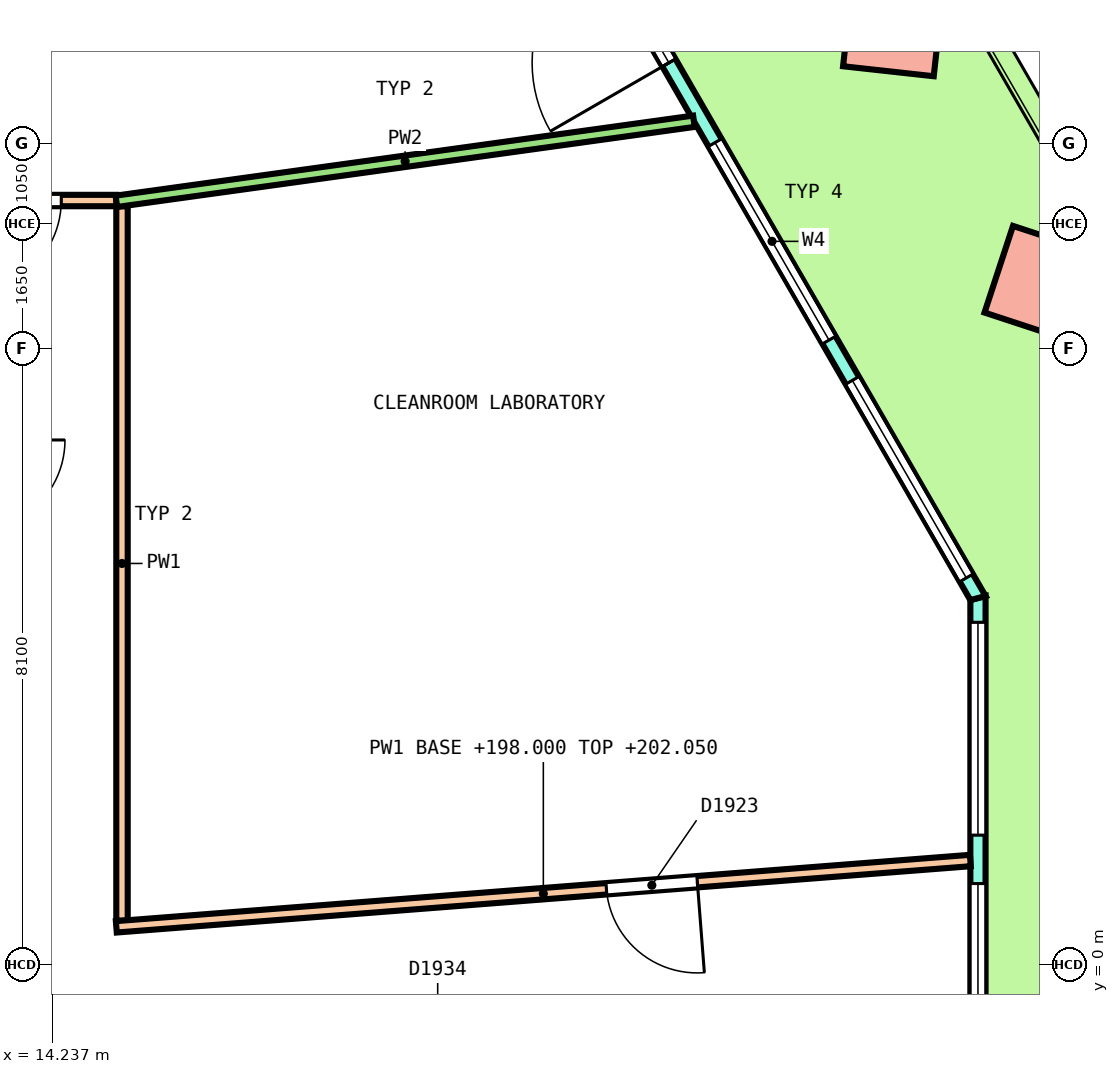
"""IFC4 building model, lengths in metres.
Left out: names, types, materials, properties, quantities, classifications, styles, units other than length and angle.
Written with IfcOpenShell. Run it as: python <this file> out.ifc"""

import sys

from ifc_helpers import new_model, si_unit, direction, frame, frame_2d, origin, origin_2d, place, context, subcontext, project, spatial, polyline, rectangle, outline, extrude, element, fill, save


model = new_model("IFC4")
c1 = context("Model", 3, precision=1e-05, world=origin(), true_north=direction((0.0, 1.0)))
c2 = subcontext(c1, "Body", "Model", "MODEL_VIEW")
j1 = project(units=[si_unit("LENGTHUNIT", "METRE"), si_unit("PLANEANGLEUNIT", "RADIAN")], contexts=[c1])
p1 = place(None, origin())
s1 = spatial("IfcSite", under=j1, at=p1, CompositionType="ELEMENT")
p2 = place(p1, origin())
s2 = spatial("IfcBuilding", under=s1, at=p2, CompositionType="ELEMENT")
p3 = place(p2, frame((0.0, 0.0, 198.0)))
s3 = spatial("IfcBuildingStorey", under=s2, at=p3, CompositionType="ELEMENT", Elevation=198.0)
p4 = place(p3, frame((27.255, 8.959, 0.0), z_axis=(-0.206606302498, -0.238581087409, 0.9488903522), x_axis=(-0.524170547966, 0.845891471379, 0.09855381927)))
e1 = element("IfcColumn", 1, at=p4, inside=s3, PredefinedType="COLUMN", context=c2, shape_type="SweptSolid", body=[
    extrude(rectangle(XDim=1.2, YDim=1.2, at=origin_2d()), origin(), (0.0, 0.0, 1.0), 4.268),
])
p5 = place(p3, frame((25.299, 12.347, 0.0), z_axis=(-0.242193067254, -0.17977691371, 0.953426861102), x_axis=(-0.508628610196, 0.860352489456, 0.033023185463)))
e2 = element("IfcColumn", 2, at=p5, inside=s3, PredefinedType="COLUMN", context=c2, shape_type="SweptSolid", body=[
    extrude(rectangle(XDim=1.2, YDim=1.2, at=origin_2d()), origin(), (0.0, 0.0, 1.0), 4.248),
])
p6 = place(p3, frame((26.411, -2.055, 0.0), z_axis=(0.0, 0.0, 1.0), x_axis=(0.0, 1.0, 0.0)))
e3 = element("IfcWall", 3, at=p6, inside=s3, PredefinedType="SOLIDWALL", context=c2, shape_type="SweptSolid", body=[
    extrude(outline(polyline([(-0.027, -0.1), (1.128, -0.1), (2.283, -0.1), (3.438, -0.1), (4.592, -0.1), (5.747, -0.1), (6.902, -0.1), (6.848, 0.1), (5.711, 0.1), (4.574, 0.1), (3.438, 0.1), (2.301, 0.1), (1.164, 0.1), (0.027, 0.1), (-0.027, -0.1)])), origin(), (0.0, 0.0, 1.0), 4.1),
])
p7 = place(p6, frame((0.319, 0.0, 0.1)))
e4 = element("IfcOpeningElement", 4, at=p7, cuts=e3, PredefinedType="OPENING", context=c2, shape_type="SweptSolid", body=[
    extrude(rectangle(XDim=2.8, YDim=2.9, at=frame_2d((1.4, 1.45))), frame((0.0, 0.11, 0.0), z_axis=(0.0, -1.0, 0.0), x_axis=(1.0, 0.0, 0.0)), (0.0, 0.0, 1.0), 0.22),
])
p8 = place(p6, frame((3.756, 0.0, 0.1)))
e5 = element("IfcOpeningElement", 5, at=p8, cuts=e3, PredefinedType="OPENING", context=c2, shape_type="SweptSolid", body=[
    extrude(rectangle(XDim=2.8, YDim=2.9, at=frame_2d((1.4, 1.45))), frame((0.0, 0.11, 0.0), z_axis=(0.0, -1.0, 0.0), x_axis=(1.0, 0.0, 0.0)), (0.0, 0.0, 1.0), 0.22),
])
p9 = place(p3, frame((26.411, 4.82, 0.0), z_axis=(0.0, 0.0, 1.0), x_axis=(-0.500000137386, 0.866025324465, 0.0)))
e6 = element("IfcWall", 6, at=p9, inside=s3, PredefinedType="SOLIDWALL", context=c2, shape_type="SweptSolid", body=[
    extrude(outline(polyline([(-0.027, -0.1), (0.979, -0.1), (1.986, -0.1), (2.992, -0.1), (3.999, -0.1), (5.005, -0.1), (6.012, -0.1), (7.018, -0.1), (8.025, -0.1), (9.031, -0.1), (10.038, -0.1), (11.044, -0.1), (12.051, -0.1), (13.057, -0.1), (14.063, -0.1), (15.07, -0.1), (16.076, -0.1), (17.083, -0.1), (18.089, -0.1), (18.036, 0.1), (17.035, 0.1), (16.035, 0.1), (15.034, 0.1), (14.034, 0.1), (13.033, 0.1), (12.033, 0.1), (11.032, 0.1), (10.032, 0.1), (9.031, 0.1), (8.031, 0.1), (7.03, 0.1), (6.03, 0.1), (5.029, 0.1), (4.029, 0.1), (3.028, 0.1), (2.028, 0.1), (1.027, 0.1), (0.027, 0.1), (-0.027, -0.1)])), origin(), (0.0, 0.0, 1.0), 4.1),
])
p10 = place(p9, frame((0.306, 0.0, 0.1)))
e7 = element("IfcOpeningElement", 7, at=p10, cuts=e6, PredefinedType="OPENING", context=c2, shape_type="SweptSolid", body=[
    extrude(rectangle(XDim=3.0, YDim=2.9, at=frame_2d((1.5, 1.45))), frame((0.0, 0.11, 0.0), z_axis=(0.0, -1.0, 0.0), x_axis=(1.0, 0.0, 0.0)), (0.0, 0.0, 1.0), 0.22),
])
p11 = place(p9, frame((3.919, 0.0, 0.1)))
e8 = element("IfcOpeningElement", 8, at=p11, cuts=e6, PredefinedType="OPENING", context=c2, shape_type="SweptSolid", body=[
    extrude(rectangle(XDim=3.0, YDim=2.9, at=frame_2d((1.5, 1.45))), frame((0.0, 0.11, 0.0), z_axis=(0.0, -1.0, 0.0), x_axis=(1.0, 0.0, 0.0)), (0.0, 0.0, 1.0), 0.22),
])
p12 = place(p9, frame((8.131, 0.0, 0.0)))
e9 = element("IfcOpeningElement", 9, at=p12, cuts=e6, PredefinedType="OPENING", context=c2, shape_type="SweptSolid", body=[
    extrude(rectangle(XDim=1.8, YDim=2.4, at=frame_2d((0.9, 1.2))), frame((0.0, 0.11, 0.0), z_axis=(0.0, -1.0, 0.0), x_axis=(1.0, 0.0, 0.0)), (0.0, 0.0, 1.0), 0.22),
])
p13 = place(p9, frame((8.131, 0.0, 2.55)))
e10 = element("IfcOpeningElement", 10, at=p13, cuts=e6, PredefinedType="OPENING", context=c2, shape_type="SweptSolid", body=[
    extrude(rectangle(XDim=1.8, YDim=0.45, at=frame_2d((0.9, 0.225))), frame((0.0, 0.11, 0.0), z_axis=(0.0, -1.0, 0.0), x_axis=(1.0, 0.0, 0.0)), (0.0, 0.0, 1.0), 0.22),
])
p14 = place(p9, frame((11.144, 0.0, 0.1)))
e11 = element("IfcOpeningElement", 11, at=p14, cuts=e6, PredefinedType="OPENING", context=c2, shape_type="SweptSolid", body=[
    extrude(rectangle(XDim=3.0, YDim=2.9, at=frame_2d((1.5, 1.45))), frame((0.0, 0.11, 0.0), z_axis=(0.0, -1.0, 0.0), x_axis=(1.0, 0.0, 0.0)), (0.0, 0.0, 1.0), 0.22),
])
p15 = place(p9, frame((14.756, 0.0, 0.1)))
e12 = element("IfcOpeningElement", 12, at=p15, cuts=e6, PredefinedType="OPENING", context=c2, shape_type="SweptSolid", body=[
    extrude(rectangle(XDim=3.0, YDim=2.9, at=frame_2d((1.5, 1.45))), frame((0.0, 0.11, 0.0), z_axis=(0.0, -1.0, 0.0), x_axis=(1.0, 0.0, 0.0)), (0.0, 0.0, 1.0), 0.22),
])
p16 = place(p3, frame((15.15, 0.576, 0.0), z_axis=(0.0, 0.0, 1.0), x_axis=(0.0, 1.0, 0.0)))
e13 = element("IfcWall", 13, at=p16, inside=s3, PredefinedType="PARTITIONING", context=c2, shape_type="SweptSolid", body=[
    extrude(rectangle(XDim=9.399, YDim=0.15, at=frame_2d((4.7, 0.0))), origin(), (0.0, 0.0, 1.0), 3.05),
])
p17 = place(p3, frame((-15.075, 10.05, 0.0), z_axis=(0.0, 0.0, 1.0), x_axis=(1.0, 0.0, 0.0)))
e14 = element("IfcWall", 14, at=p17, inside=s3, PredefinedType="PARTITIONING", context=c2, shape_type="SweptSolid", body=[
    extrude(rectangle(XDim=30.15, YDim=0.15, at=frame_2d((15.075, 0.0))), origin(), (0.0, 0.0, 1.0), 3.05),
])
p18 = place(p17, frame((28.226, 0.0, 0.0)))
e15 = element("IfcOpeningElement", 15, at=p18, cuts=e14, PredefinedType="OPENING", context=c2, shape_type="SweptSolid", body=[
    extrude(rectangle(XDim=1.2, YDim=2.1, at=frame_2d((0.6, 1.05))), frame((0.0, 0.085, 0.0), z_axis=(0.0, -1.0, 0.0), x_axis=(1.0, 0.0, 0.0)), (0.0, 0.0, 1.0), 0.17),
])
p19 = place(p17, frame((17.28, 0.0, 0.0)))
e16 = element("IfcOpeningElement", 16, at=p19, cuts=e14, PredefinedType="OPENING", context=c2, shape_type="SweptSolid", body=[
    extrude(rectangle(XDim=1.2, YDim=2.1, at=frame_2d((0.6, 1.05))), frame((0.0, 0.085, 0.0), z_axis=(0.0, -1.0, 0.0), x_axis=(1.0, 0.0, 0.0)), (0.0, 0.0, 1.0), 0.17),
])
p20 = place(p17, frame((3.015, 0.0, 0.0)))
e17 = element("IfcOpeningElement", 17, at=p20, cuts=e14, PredefinedType="OPENING", context=c2, shape_type="SweptSolid", body=[
    extrude(rectangle(XDim=1.2, YDim=2.1, at=frame_2d((0.6, 1.05))), frame((0.0, 0.085, 0.0), z_axis=(0.0, -1.0, 0.0), x_axis=(1.0, 0.0, 0.0)), (0.0, 0.0, 1.0), 0.17),
])
p21 = place(p3, frame((15.075, 0.495, 0.0), z_axis=(0.0, 0.0, 1.0), x_axis=(0.996999820834, 0.077403858151, 0.0)))
e18 = element("IfcWall", 18, at=p21, inside=s3, PredefinedType="PARTITIONING", context=c2, shape_type="SweptSolid", body=[
    extrude(rectangle(XDim=11.27, YDim=0.15, at=frame_2d((5.635, 0.0))), origin(), (0.0, 0.0, 1.0), 4.05),
])
p22 = place(p21, frame((6.467, 0.0, 0.0)))
e19 = element("IfcOpeningElement", 19, at=p22, cuts=e18, PredefinedType="OPENING", context=c2, shape_type="SweptSolid", body=[
    extrude(rectangle(XDim=1.2, YDim=2.1, at=frame_2d((0.6, 1.05))), frame((0.0, 0.085, 0.0), z_axis=(0.0, -1.0, 0.0), x_axis=(1.0, 0.0, 0.0)), (0.0, 0.0, 1.0), 0.17),
])
p23 = place(p3, frame((15.076, 10.04, 0.0), z_axis=(0.0, 0.0, 1.0), x_axis=(0.990534028254, 0.137267399154, 0.0)))
e20 = element("IfcWall", 20, at=p23, inside=s3, PredefinedType="PARTITIONING", context=c2, shape_type="SweptSolid", body=[
    extrude(rectangle(XDim=7.671, YDim=0.15, at=frame_2d((3.835, 0.0))), origin(), (0.0, 0.0, 1.0), 3.05),
])
p24 = place(p7, origin())
e21 = element("IfcWindow", 21, at=p24, inside=s3, PartitioningType="SINGLE_PANEL", PredefinedType="WINDOW", context=c2, shape_type="SweptSolid", body=[
    extrude(rectangle(XDim=2.8, YDim=2.9, at=frame_2d((1.4, 1.45))), frame((0.0, 0.03, 0.0), z_axis=(0.0, -1.0, 0.0), x_axis=(1.0, 0.0, 0.0)), (0.0, 0.0, 1.0), 0.06),
])
fill(e4, e21)
p25 = place(p8, origin())
e22 = element("IfcWindow", 22, at=p25, inside=s3, PartitioningType="SINGLE_PANEL", PredefinedType="WINDOW", context=c2, shape_type="SweptSolid", body=[
    extrude(rectangle(XDim=2.8, YDim=2.9, at=frame_2d((1.4, 1.45))), frame((0.0, 0.03, 0.0), z_axis=(0.0, -1.0, 0.0), x_axis=(1.0, 0.0, 0.0)), (0.0, 0.0, 1.0), 0.06),
])
fill(e5, e22)
p26 = place(p10, origin())
e23 = element("IfcWindow", 23, at=p26, inside=s3, PartitioningType="SINGLE_PANEL", PredefinedType="WINDOW", context=c2, shape_type="SweptSolid", body=[
    extrude(rectangle(XDim=3.0, YDim=2.9, at=frame_2d((1.5, 1.45))), frame((0.0, 0.03, 0.0), z_axis=(0.0, -1.0, 0.0), x_axis=(1.0, 0.0, 0.0)), (0.0, 0.0, 1.0), 0.06),
])
fill(e7, e23)
p27 = place(p11, origin())
e24 = element("IfcWindow", 24, at=p27, inside=s3, PartitioningType="SINGLE_PANEL", PredefinedType="WINDOW", context=c2, shape_type="SweptSolid", body=[
    extrude(rectangle(XDim=3.0, YDim=2.9, at=frame_2d((1.5, 1.45))), frame((0.0, 0.03, 0.0), z_axis=(0.0, -1.0, 0.0), x_axis=(1.0, 0.0, 0.0)), (0.0, 0.0, 1.0), 0.06),
])
fill(e8, e24)
p28 = place(p12, origin())
e25 = element("IfcDoor", 25, at=p28, inside=s3, OperationType="DOUBLE_DOOR_SINGLE_SWING", PredefinedType="DOOR", context=c2, shape_type="SweptSolid", body=[
    extrude(rectangle(XDim=1.8, YDim=2.4, at=frame_2d((0.9, 1.2))), frame((0.0, 0.025, 0.0), z_axis=(0.0, -1.0, 0.0), x_axis=(1.0, 0.0, 0.0)), (0.0, 0.0, 1.0), 0.05),
])
fill(e9, e25)
p29 = place(p13, origin())
e26 = element("IfcWindow", 26, at=p29, inside=s3, PartitioningType="SINGLE_PANEL", PredefinedType="WINDOW", context=c2, shape_type="SweptSolid", body=[
    extrude(rectangle(XDim=1.8, YDim=0.45, at=frame_2d((0.9, 0.225))), frame((0.0, 0.03, 0.0), z_axis=(0.0, -1.0, 0.0), x_axis=(1.0, 0.0, 0.0)), (0.0, 0.0, 1.0), 0.06),
])
fill(e10, e26)
p30 = place(p22, origin())
e27 = element("IfcDoor", 27, at=p30, inside=s3, OperationType="DOUBLE_DOOR_SINGLE_SWING", PredefinedType="DOOR", context=c2, shape_type="SweptSolid", body=[
    extrude(rectangle(XDim=1.2, YDim=2.1, at=frame_2d((0.6, 1.05))), frame((0.0, 0.025, 0.0), z_axis=(0.0, -1.0, 0.0), x_axis=(1.0, 0.0, 0.0)), (0.0, 0.0, 1.0), 0.05),
])
fill(e19, e27)
p31 = place(p18, origin())
e28 = element("IfcDoor", 28, at=p31, inside=s3, OperationType="DOUBLE_DOOR_SINGLE_SWING", PredefinedType="DOOR", context=c2, shape_type="SweptSolid", body=[
    extrude(rectangle(XDim=1.2, YDim=2.1, at=frame_2d((0.6, 1.05))), frame((0.0, 0.025, 0.0), z_axis=(0.0, -1.0, 0.0), x_axis=(1.0, 0.0, 0.0)), (0.0, 0.0, 1.0), 0.05),
])
fill(e15, e28)
save(model, sys.argv[1])
